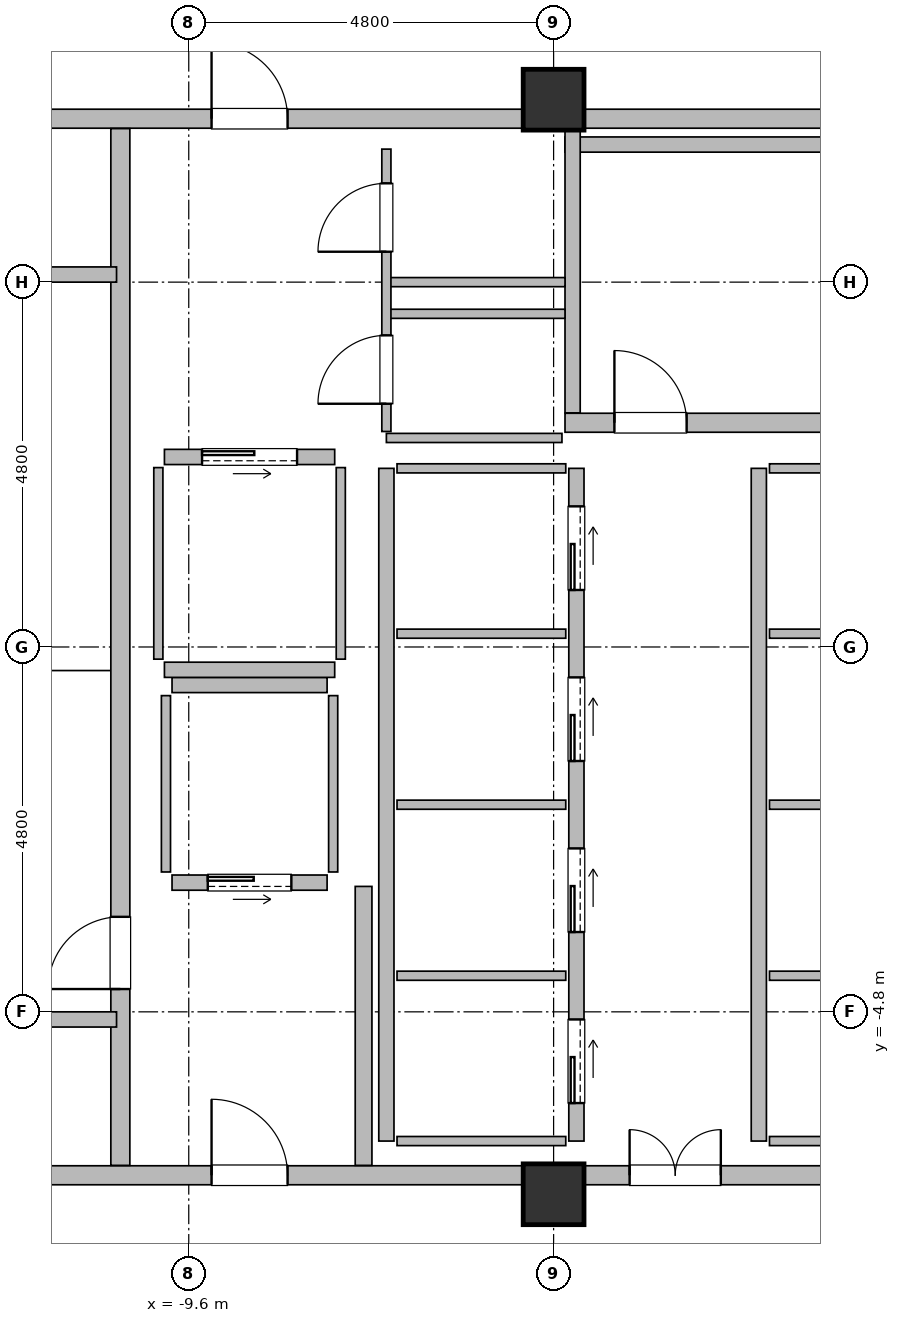
"""IFC4 building model, lengths in metres.
Left out: names, types, materials, properties, quantities, classifications, styles, units other than length and angle.
Written with IfcOpenShell. Run it as: python <this file> out.ifc"""

import sys

from ifc_helpers import new_model, si_unit, direction, frame, frame_2d, origin, origin_2d, place, context, subcontext, project, spatial, rectangle, hollow_rectangle, extrude, element, fill, save


model = new_model("IFC4")
c1 = context("Model", 3, precision=1e-05, world=origin(), true_north=direction((0.0, 1.0)))
c2 = subcontext(c1, "Body", "Model", "MODEL_VIEW")
j1 = project(units=[si_unit("LENGTHUNIT", "METRE"), si_unit("PLANEANGLEUNIT", "RADIAN")], contexts=[c1])
p1 = place(None, origin())
s1 = spatial("IfcSite", under=j1, at=p1, CompositionType="ELEMENT")
p2 = place(p1, origin())
s2 = spatial("IfcBuilding", under=s1, at=p2, CompositionType="ELEMENT")
p3 = place(p2, frame((0.0, 0.0, 48.5)))
s3 = spatial("IfcBuildingStorey", under=s2, at=p3, CompositionType="ELEMENT", Elevation=48.5)
for number, where, z_axis, x_axis in (
    (1, (-4.8, -7.2, 0.0), (0.0, 0.0, 1.0), (1.0, 0.0, 0.0)),
    (2, (-4.8, 7.2, 0.0), (0.0, 0.0, 1.0), (1.0, 0.0, 0.0)),
):
    element("IfcColumn", number, at=place(p3, frame(where, z_axis=z_axis, x_axis=x_axis)), inside=s3, PredefinedType="COLUMN", context=c2, shape_type="SweptSolid", body=[
        extrude(hollow_rectangle(XDim=0.8, YDim=0.8, WallThickness=0.036, at=origin_2d()), origin(), (0.0, 0.0, 1.0), 3.7),
    ])
p4 = place(p3, frame((-14.2, -6.95, 0.0), z_axis=(0.0, 0.0, 1.0), x_axis=(1.0, 0.0, 0.0)))
e3 = element("IfcWall", 3, at=p4, inside=s3, PredefinedType="SOLIDWALL", context=c2, shape_type="SweptSolid", body=[
    extrude(rectangle(XDim=9.4, YDim=0.25, at=frame_2d((4.7, 0.0))), origin(), (0.0, 0.0, 1.0), 2.62),
])
p5 = place(p4, frame((4.9, 0.0, 0.0)))
e4 = element("IfcOpeningElement", 4, at=p5, cuts=e3, PredefinedType="OPENING", context=c2, shape_type="SweptSolid", body=[
    extrude(rectangle(XDim=1.0, YDim=2.15, at=frame_2d((0.5, 1.075))), frame((0.0, 0.14, 0.0), z_axis=(0.0, -1.0, 0.0), x_axis=(1.0, 0.0, 0.0)), (0.0, 0.0, 1.0), 0.28),
])
p6 = place(p3, frame((-4.6, -6.95, 0.0), z_axis=(0.0, 0.0, 1.0), x_axis=(1.0, 0.0, 0.0)))
e5 = element("IfcWall", 5, at=p6, inside=s3, PredefinedType="SOLIDWALL", context=c2, shape_type="SweptSolid", body=[
    extrude(rectangle(XDim=9.2, YDim=0.25, at=frame_2d((4.6, 0.0))), origin(), (0.0, 0.0, 1.0), 2.32),
])
p7 = place(p6, frame((0.8, 0.0, 0.0)))
e6 = element("IfcOpeningElement", 6, at=p7, cuts=e5, PredefinedType="OPENING", context=c2, shape_type="SweptSolid", body=[
    extrude(rectangle(XDim=1.2, YDim=2.2, at=frame_2d((0.6, 1.1))), frame((0.0, 0.14, 0.0), z_axis=(0.0, -1.0, 0.0), x_axis=(1.0, 0.0, 0.0)), (0.0, 0.0, 1.0), 0.28),
])
p8 = place(p6, frame((5.55, 0.0, 0.0)))
e7 = element("IfcOpeningElement", 7, at=p8, cuts=e5, PredefinedType="OPENING", context=c2, shape_type="SweptSolid", body=[
    extrude(rectangle(XDim=1.2, YDim=2.2, at=frame_2d((0.6, 1.1))), frame((0.0, 0.14, 0.0), z_axis=(0.0, -1.0, 0.0), x_axis=(1.0, 0.0, 0.0)), (0.0, 0.0, 1.0), 0.28),
])
p9 = place(p3, frame((-14.2, 6.95, 0.0), z_axis=(0.0, 0.0, 1.0), x_axis=(1.0, 0.0, 0.0)))
e8 = element("IfcWall", 8, at=p9, inside=s3, PredefinedType="SOLIDWALL", context=c2, shape_type="SweptSolid", body=[
    extrude(rectangle(XDim=9.4, YDim=0.25, at=frame_2d((4.7, 0.0))), origin(), (0.0, 0.0, 1.0), 2.62),
])
p10 = place(p9, frame((4.9, 0.0, 0.0)))
e9 = element("IfcOpeningElement", 9, at=p10, cuts=e8, PredefinedType="OPENING", context=c2, shape_type="SweptSolid", body=[
    extrude(rectangle(XDim=1.0, YDim=2.15, at=frame_2d((0.5, 1.075))), frame((0.0, 0.14, 0.0), z_axis=(0.0, -1.0, 0.0), x_axis=(1.0, 0.0, 0.0)), (0.0, 0.0, 1.0), 0.28),
])
p11 = place(p3, frame((-4.6, 6.95, 0.0), z_axis=(0.0, 0.0, 1.0), x_axis=(1.0, 0.0, 0.0)))
e10 = element("IfcWall", 10, at=p11, inside=s3, PredefinedType="SOLIDWALL", context=c2, shape_type="SweptSolid", body=[
    extrude(rectangle(XDim=9.2, YDim=0.25, at=frame_2d((4.6, 0.0))), origin(), (0.0, 0.0, 1.0), 2.62),
])
p12 = place(p3, frame((-7.3, -6.82, 0.0), z_axis=(0.0, 0.0, 1.0), x_axis=(0.0, 1.0, 0.0)))
e11 = element("IfcWall", 11, at=p12, inside=s3, PredefinedType="SOLIDWALL", context=c2, shape_type="SweptSolid", body=[
    extrude(rectangle(XDim=3.67, YDim=0.22, at=frame_2d((1.835, 0.0))), origin(), (0.0, 0.0, 1.0), 2.62),
])
p13 = place(p3, frame((-10.5, -6.82, -0.18), z_axis=(0.0, 0.0, 1.0), x_axis=(0.0, 1.0, 0.0)))
e12 = element("IfcWall", 12, at=p13, inside=s3, PredefinedType="SOLIDWALL", context=c2, shape_type="SweptSolid", body=[
    extrude(rectangle(XDim=13.64, YDim=0.25, at=frame_2d((6.82, 0.0))), origin(), (0.0, 0.0, 1.0), 3.7),
])
p14 = place(p13, frame((2.32, 0.0, 0.18)))
e13 = element("IfcOpeningElement", 13, at=p14, cuts=e12, PredefinedType="OPENING", context=c2, shape_type="SweptSolid", body=[
    extrude(rectangle(XDim=0.95, YDim=2.15, at=frame_2d((0.475, 1.075))), frame((0.0, 0.14, 0.0), z_axis=(0.0, -1.0, 0.0), x_axis=(1.0, 0.0, 0.0)), (0.0, 0.0, 1.0), 0.28),
])
for number, where, z_axis, x_axis in (
    (14, (-14.2, -4.9, -0.18), (0.0, 0.0, 1.0), (1.0, 0.0, 0.0)),
    (15, (-14.2, 4.9, -0.18), (0.0, 0.0, 1.0), (1.0, 0.0, 0.0)),
):
    element("IfcWall", number, at=place(p3, frame(where, z_axis=z_axis, x_axis=x_axis)), inside=s3, PredefinedType="SOLIDWALL", context=c2, shape_type="SweptSolid", body=[
        extrude(rectangle(XDim=3.65, YDim=0.2, at=frame_2d((1.825, 0.0))), origin(), (0.0, 0.0, 1.0), 3.7),
    ])
p15 = place(p3, frame((-4.65, 2.95, -0.18), z_axis=(0.0, 0.0, 1.0), x_axis=(1.0, 0.0, 0.0)))
e16 = element("IfcWall", 16, at=p15, inside=s3, PredefinedType="SOLIDWALL", context=c2, shape_type="SweptSolid", body=[
    extrude(rectangle(XDim=9.9, YDim=0.25, at=frame_2d((4.95, 0.0))), origin(), (0.0, 0.0, 1.0), 3.7),
])
p16 = place(p15, frame((0.65, 0.0, 0.18)))
e17 = element("IfcOpeningElement", 17, at=p16, cuts=e16, PredefinedType="OPENING", context=c2, shape_type="SweptSolid", body=[
    extrude(rectangle(XDim=0.95, YDim=2.15, at=frame_2d((0.475, 1.075))), frame((0.0, 0.14, 0.0), z_axis=(0.0, -1.0, 0.0), x_axis=(1.0, 0.0, 0.0)), (0.0, 0.0, 1.0), 0.28),
])
p17 = place(p3, frame((-4.65, 6.61, -0.18), z_axis=(0.0, 0.0, 1.0), x_axis=(1.0, 0.0, 0.0)))
e18 = element("IfcWall", 18, at=p17, inside=s3, PredefinedType="SOLIDWALL", context=c2, shape_type="SweptSolid", body=[
    extrude(rectangle(XDim=9.9, YDim=0.2, at=frame_2d((4.95, 0.0))), origin(), (0.0, 0.0, 1.0), 3.7),
])
p18 = place(p3, frame((-4.55, 3.08, -0.18), z_axis=(0.0, 0.0, 1.0), x_axis=(0.0, 1.0, 0.0)))
e19 = element("IfcWall", 19, at=p18, inside=s3, PredefinedType="SOLIDWALL", context=c2, shape_type="SweptSolid", body=[
    extrude(rectangle(XDim=3.74, YDim=0.2, at=frame_2d((1.87, 0.0))), origin(), (0.0, 0.0, 1.0), 3.7),
])
p19 = place(p3, frame((-4.5, -6.5, 0.0), z_axis=(0.0, 0.0, 1.0), x_axis=(0.0, 1.0, 0.0)))
e20 = element("IfcWall", 20, at=p19, inside=s3, PredefinedType="SOLIDWALL", context=c2, shape_type="SweptSolid", body=[
    extrude(rectangle(XDim=8.85, YDim=0.2, at=frame_2d((4.425, 0.0))), origin(), (0.0, 0.0, 1.0), 3.52),
])
p20 = place(p19, frame((0.5, 0.0, 0.0)))
e21 = element("IfcOpeningElement", 21, at=p20, cuts=e20, PredefinedType="OPENING", context=c2, shape_type="SweptSolid", body=[
    extrude(rectangle(XDim=1.1, YDim=2.2, at=frame_2d((0.55, 1.1))), frame((0.0, 0.115, 0.0), z_axis=(0.0, -1.0, 0.0), x_axis=(1.0, 0.0, 0.0)), (0.0, 0.0, 1.0), 0.23),
])
p21 = place(p19, frame((2.75, 0.0, 0.0)))
e22 = element("IfcOpeningElement", 22, at=p21, cuts=e20, PredefinedType="OPENING", context=c2, shape_type="SweptSolid", body=[
    extrude(rectangle(XDim=1.1, YDim=2.2, at=frame_2d((0.55, 1.1))), frame((0.0, 0.115, 0.0), z_axis=(0.0, -1.0, 0.0), x_axis=(1.0, 0.0, 0.0)), (0.0, 0.0, 1.0), 0.23),
])
p22 = place(p19, frame((5.0, 0.0, 0.0)))
e23 = element("IfcOpeningElement", 23, at=p22, cuts=e20, PredefinedType="OPENING", context=c2, shape_type="SweptSolid", body=[
    extrude(rectangle(XDim=1.1, YDim=2.2, at=frame_2d((0.55, 1.1))), frame((0.0, 0.115, 0.0), z_axis=(0.0, -1.0, 0.0), x_axis=(1.0, 0.0, 0.0)), (0.0, 0.0, 1.0), 0.23),
])
p23 = place(p19, frame((7.25, 0.0, 0.0)))
e24 = element("IfcOpeningElement", 24, at=p23, cuts=e20, PredefinedType="OPENING", context=c2, shape_type="SweptSolid", body=[
    extrude(rectangle(XDim=1.1, YDim=2.2, at=frame_2d((0.55, 1.1))), frame((0.0, 0.115, 0.0), z_axis=(0.0, -1.0, 0.0), x_axis=(1.0, 0.0, 0.0)), (0.0, 0.0, 1.0), 0.23),
])
p24 = place(p3, frame((-7.0, -6.5, 0.0), z_axis=(0.0, 0.0, 1.0), x_axis=(0.0, 1.0, 0.0)))
e25 = element("IfcWall", 25, at=p24, inside=s3, PredefinedType="SOLIDWALL", context=c2, shape_type="SweptSolid", body=[
    extrude(rectangle(XDim=8.85, YDim=0.2, at=frame_2d((4.425, 0.0))), origin(), (0.0, 0.0, 1.0), 3.52),
])
for number, where, z_axis, x_axis in (
    (26, (-6.86, -6.5, 0.0), (0.0, 0.0, 1.0), (1.0, 0.0, 0.0)),
    (27, (-6.86, -4.325, 0.0), (0.0, 0.0, 1.0), (1.0, 0.0, 0.0)),
    (28, (-6.86, -2.075, 0.0), (0.0, 0.0, 1.0), (1.0, 0.0, 0.0)),
    (29, (-6.86, 0.175, 0.0), (0.0, 0.0, 1.0), (1.0, 0.0, 0.0)),
    (30, (-6.86, 2.35, 0.0), (0.0, 0.0, 1.0), (1.0, 0.0, 0.0)),
):
    element("IfcWall", number, at=place(p3, frame(where, z_axis=z_axis, x_axis=x_axis)), inside=s3, PredefinedType="PARTITIONING", context=c2, shape_type="SweptSolid", body=[
        extrude(rectangle(XDim=2.22, YDim=0.12, at=frame_2d((1.11, 0.0))), origin(), (0.0, 0.0, 1.0), 3.52),
    ])
p25 = place(p3, frame((-2.1, -6.5, 0.0), z_axis=(0.0, 0.0, 1.0), x_axis=(0.0, 1.0, 0.0)))
e31 = element("IfcWall", 31, at=p25, inside=s3, PredefinedType="SOLIDWALL", context=c2, shape_type="SweptSolid", body=[
    extrude(rectangle(XDim=8.85, YDim=0.2, at=frame_2d((4.425, 0.0))), origin(), (0.0, 0.0, 1.0), 3.52),
])
for number, where, z_axis, x_axis in (
    (32, (-1.96, -6.5, 0.0), (0.0, 0.0, 1.0), (1.0, 0.0, 0.0)),
    (33, (-1.96, -4.325, 0.0), (0.0, 0.0, 1.0), (1.0, 0.0, 0.0)),
    (34, (-1.96, -2.075, 0.0), (0.0, 0.0, 1.0), (1.0, 0.0, 0.0)),
    (35, (-1.96, 0.175, 0.0), (0.0, 0.0, 1.0), (1.0, 0.0, 0.0)),
    (36, (-1.96, 2.35, 0.0), (0.0, 0.0, 1.0), (1.0, 0.0, 0.0)),
):
    element("IfcWall", number, at=place(p3, frame(where, z_axis=z_axis, x_axis=x_axis)), inside=s3, PredefinedType="PARTITIONING", context=c2, shape_type="SweptSolid", body=[
        extrude(rectangle(XDim=2.22, YDim=0.12, at=frame_2d((1.11, 0.0))), origin(), (0.0, 0.0, 1.0), 3.52),
    ])
p26 = place(p3, frame((-9.82, -3.1, 0.0), z_axis=(0.0, 0.0, 1.0), x_axis=(1.0, 0.0, 0.0)))
e37 = element("IfcWall", 37, at=p26, inside=s3, PredefinedType="SOLIDWALL", context=c2, shape_type="SweptSolid", body=[
    extrude(rectangle(XDim=2.04, YDim=0.2, at=frame_2d((1.02, 0.0))), origin(), (0.0, 0.0, 1.0), 3.52),
])
p27 = place(p26, frame((0.47, 0.0, 0.0)))
e38 = element("IfcOpeningElement", 38, at=p27, cuts=e37, PredefinedType="OPENING", context=c2, shape_type="SweptSolid", body=[
    extrude(rectangle(XDim=1.1, YDim=2.2, at=frame_2d((0.55, 1.1))), frame((0.0, 0.115, 0.0), z_axis=(0.0, -1.0, 0.0), x_axis=(1.0, 0.0, 0.0)), (0.0, 0.0, 1.0), 0.23),
])
p28 = place(p3, frame((-9.82, -0.5, 0.0), z_axis=(0.0, 0.0, 1.0), x_axis=(1.0, 0.0, 0.0)))
e39 = element("IfcWall", 39, at=p28, inside=s3, PredefinedType="SOLIDWALL", context=c2, shape_type="SweptSolid", body=[
    extrude(rectangle(XDim=2.04, YDim=0.2, at=frame_2d((1.02, 0.0))), origin(), (0.0, 0.0, 1.0), 3.52),
])
for number, where, z_axis, x_axis in (
    (40, (-9.9, -2.96, 0.0), (0.0, 0.0, 1.0), (0.0, 1.0, 0.0)),
    (41, (-7.7, -2.96, 0.0), (0.0, 0.0, 1.0), (0.0, 1.0, 0.0)),
):
    element("IfcWall", number, at=place(p3, frame(where, z_axis=z_axis, x_axis=x_axis)), inside=s3, PredefinedType="PARTITIONING", context=c2, shape_type="SweptSolid", body=[
        extrude(rectangle(XDim=2.32, YDim=0.12, at=frame_2d((1.16, 0.0))), origin(), (0.0, 0.0, 1.0), 3.52),
    ])
p29 = place(p3, frame((-9.92, 2.5, 0.0), z_axis=(0.0, 0.0, 1.0), x_axis=(1.0, 0.0, 0.0)))
e42 = element("IfcWall", 42, at=p29, inside=s3, PredefinedType="SOLIDWALL", context=c2, shape_type="SweptSolid", body=[
    extrude(rectangle(XDim=2.24, YDim=0.2, at=frame_2d((1.12, 0.0))), origin(), (0.0, 0.0, 1.0), 3.52),
])
p30 = place(p29, frame((0.495, 0.0, 0.0)))
e43 = element("IfcOpeningElement", 43, at=p30, cuts=e42, PredefinedType="OPENING", context=c2, shape_type="SweptSolid", body=[
    extrude(rectangle(XDim=1.25, YDim=2.25, at=frame_2d((0.625, 1.125))), frame((0.0, 0.115, 0.0), z_axis=(0.0, -1.0, 0.0), x_axis=(1.0, 0.0, 0.0)), (0.0, 0.0, 1.0), 0.23),
])
p31 = place(p3, frame((-9.92, -0.3, 0.0), z_axis=(0.0, 0.0, 1.0), x_axis=(1.0, 0.0, 0.0)))
e44 = element("IfcWall", 44, at=p31, inside=s3, PredefinedType="SOLIDWALL", context=c2, shape_type="SweptSolid", body=[
    extrude(rectangle(XDim=2.24, YDim=0.2, at=frame_2d((1.12, 0.0))), origin(), (0.0, 0.0, 1.0), 3.52),
])
for number, where, z_axis, x_axis in (
    (45, (-10.0, -0.16, 0.0), (0.0, 0.0, 1.0), (0.0, 1.0, 0.0)),
    (46, (-7.6, -0.16, 0.0), (0.0, 0.0, 1.0), (0.0, 1.0, 0.0)),
):
    element("IfcWall", number, at=place(p3, frame(where, z_axis=z_axis, x_axis=x_axis)), inside=s3, PredefinedType="PARTITIONING", context=c2, shape_type="SweptSolid", body=[
        extrude(rectangle(XDim=2.52, YDim=0.12, at=frame_2d((1.26, 0.0))), origin(), (0.0, 0.0, 1.0), 3.52),
    ])
p32 = place(p3, frame((-7.0, 2.75, 0.0), z_axis=(0.0, 0.0, 1.0), x_axis=(1.0, 0.0, 0.0)))
e47 = element("IfcWall", 47, at=p32, inside=s3, PredefinedType="PARTITIONING", context=c2, shape_type="SweptSolid", body=[
    extrude(rectangle(XDim=2.31, YDim=0.12, at=frame_2d((1.155, 0.0))), origin(), (0.0, 0.0, 1.0), 3.52),
])
for number, where, z_axis, x_axis in (
    (48, (-7.0, 4.383, 0.0), (0.0, 0.0, 1.0), (1.0, 0.0, 0.0)),
    (49, (-7.0, 4.8, 0.0), (0.0, 0.0, 1.0), (1.0, 0.0, 0.0)),
):
    element("IfcWall", number, at=place(p3, frame(where, z_axis=z_axis, x_axis=x_axis)), inside=s3, PredefinedType="PARTITIONING", context=c2, shape_type="SweptSolid", body=[
        extrude(rectangle(XDim=2.35, YDim=0.12, at=frame_2d((1.175, 0.0))), origin(), (0.0, 0.0, 1.0), 3.52),
    ])
p33 = place(p3, frame((-7.0, 2.835, 0.0), z_axis=(0.0, 0.0, 1.0), x_axis=(0.0, 1.0, 0.0)))
e50 = element("IfcWall", 50, at=p33, inside=s3, PredefinedType="PARTITIONING", context=c2, shape_type="SweptSolid", body=[
    extrude(rectangle(XDim=3.715, YDim=0.12, at=frame_2d((1.857, 0.0))), origin(), (0.0, 0.0, 1.0), 3.52),
])
p34 = place(p33, frame((0.365, 0.0, 0.0)))
e51 = element("IfcOpeningElement", 51, at=p34, cuts=e50, PredefinedType="OPENING", context=c2, shape_type="SweptSolid", body=[
    extrude(rectangle(XDim=0.9, YDim=2.1, at=frame_2d((0.45, 1.05))), frame((0.0, 0.075, 0.0), z_axis=(0.0, -1.0, 0.0), x_axis=(1.0, 0.0, 0.0)), (0.0, 0.0, 1.0), 0.15),
])
p35 = place(p33, frame((2.365, 0.0, 0.0)))
e52 = element("IfcOpeningElement", 52, at=p35, cuts=e50, PredefinedType="OPENING", context=c2, shape_type="SweptSolid", body=[
    extrude(rectangle(XDim=0.9, YDim=2.1, at=frame_2d((0.45, 1.05))), frame((0.0, 0.075, 0.0), z_axis=(0.0, -1.0, 0.0), x_axis=(1.0, 0.0, 0.0)), (0.0, 0.0, 1.0), 0.15),
])
p36 = place(p5, origin())
e53 = element("IfcDoor", 53, at=p36, inside=s3, OperationType="SINGLE_SWING_RIGHT", PredefinedType="DOOR", context=c2, shape_type="SweptSolid", body=[
    extrude(rectangle(XDim=1.0, YDim=2.15, at=frame_2d((0.5, 1.075))), frame((0.0, 0.025, 0.0), z_axis=(0.0, -1.0, 0.0), x_axis=(1.0, 0.0, 0.0)), (0.0, 0.0, 1.0), 0.05),
])
fill(e4, e53)
p37 = place(p7, origin())
e54 = element("IfcDoor", 54, at=p37, inside=s3, OperationType="DOUBLE_DOOR_SINGLE_SWING", PredefinedType="DOOR", context=c2, shape_type="SweptSolid", body=[
    extrude(rectangle(XDim=1.2, YDim=2.2, at=frame_2d((0.6, 1.1))), frame((0.0, 0.025, 0.0), z_axis=(0.0, -1.0, 0.0), x_axis=(1.0, 0.0, 0.0)), (0.0, 0.0, 1.0), 0.05),
])
fill(e6, e54)
p38 = place(p10, origin())
e55 = element("IfcDoor", 55, at=p38, inside=s3, OperationType="SINGLE_SWING_LEFT", PredefinedType="DOOR", context=c2, shape_type="SweptSolid", body=[
    extrude(rectangle(XDim=1.0, YDim=2.15, at=frame_2d((0.5, 1.075))), frame((0.0, 0.025, 0.0), z_axis=(0.0, -1.0, 0.0), x_axis=(1.0, 0.0, 0.0)), (0.0, 0.0, 1.0), 0.05),
])
fill(e9, e55)
p39 = place(p14, origin())
e56 = element("IfcDoor", 56, at=p39, inside=s3, OperationType="SINGLE_SWING_LEFT", PredefinedType="DOOR", context=c2, shape_type="SweptSolid", body=[
    extrude(rectangle(XDim=0.95, YDim=2.15, at=frame_2d((0.475, 1.075))), frame((0.0, 0.025, 0.0), z_axis=(0.0, -1.0, 0.0), x_axis=(1.0, 0.0, 0.0)), (0.0, 0.0, 1.0), 0.05),
])
fill(e13, e56)
p40 = place(p16, origin())
e57 = element("IfcDoor", 57, at=p40, inside=s3, OperationType="SINGLE_SWING_RIGHT", PredefinedType="DOOR", context=c2, shape_type="SweptSolid", body=[
    extrude(rectangle(XDim=0.95, YDim=2.15, at=frame_2d((0.475, 1.075))), frame((0.0, 0.025, 0.0), z_axis=(0.0, -1.0, 0.0), x_axis=(1.0, 0.0, 0.0)), (0.0, 0.0, 1.0), 0.05),
])
fill(e17, e57)
p41 = place(p20, origin())
e58 = element("IfcDoor", 58, at=p41, inside=s3, OperationType="SLIDING_TO_LEFT", PredefinedType="DOOR", context=c2, shape_type="SweptSolid", body=[
    extrude(rectangle(XDim=1.1, YDim=2.2, at=frame_2d((0.55, 1.1))), frame((0.0, 0.025, 0.0), z_axis=(0.0, -1.0, 0.0), x_axis=(1.0, 0.0, 0.0)), (0.0, 0.0, 1.0), 0.05),
])
fill(e21, e58)
p42 = place(p21, origin())
e59 = element("IfcDoor", 59, at=p42, inside=s3, OperationType="SLIDING_TO_LEFT", PredefinedType="DOOR", context=c2, shape_type="SweptSolid", body=[
    extrude(rectangle(XDim=1.1, YDim=2.2, at=frame_2d((0.55, 1.1))), frame((0.0, 0.025, 0.0), z_axis=(0.0, -1.0, 0.0), x_axis=(1.0, 0.0, 0.0)), (0.0, 0.0, 1.0), 0.05),
])
fill(e22, e59)
p43 = place(p22, origin())
e60 = element("IfcDoor", 60, at=p43, inside=s3, OperationType="SLIDING_TO_LEFT", PredefinedType="DOOR", context=c2, shape_type="SweptSolid", body=[
    extrude(rectangle(XDim=1.1, YDim=2.2, at=frame_2d((0.55, 1.1))), frame((0.0, 0.025, 0.0), z_axis=(0.0, -1.0, 0.0), x_axis=(1.0, 0.0, 0.0)), (0.0, 0.0, 1.0), 0.05),
])
fill(e23, e60)
p44 = place(p23, origin())
e61 = element("IfcDoor", 61, at=p44, inside=s3, OperationType="SLIDING_TO_LEFT", PredefinedType="DOOR", context=c2, shape_type="SweptSolid", body=[
    extrude(rectangle(XDim=1.1, YDim=2.2, at=frame_2d((0.55, 1.1))), frame((0.0, 0.025, 0.0), z_axis=(0.0, -1.0, 0.0), x_axis=(1.0, 0.0, 0.0)), (0.0, 0.0, 1.0), 0.05),
])
fill(e24, e61)
p45 = place(p27, origin())
e62 = element("IfcDoor", 62, at=p45, inside=s3, OperationType="SLIDING_TO_LEFT", PredefinedType="DOOR", context=c2, shape_type="SweptSolid", body=[
    extrude(rectangle(XDim=1.1, YDim=2.2, at=frame_2d((0.55, 1.1))), frame((0.0, 0.025, 0.0), z_axis=(0.0, -1.0, 0.0), x_axis=(1.0, 0.0, 0.0)), (0.0, 0.0, 1.0), 0.05),
])
fill(e38, e62)
p46 = place(p30, origin())
e63 = element("IfcDoor", 63, at=p46, inside=s3, OperationType="SLIDING_TO_LEFT", PredefinedType="DOOR", context=c2, shape_type="SweptSolid", body=[
    extrude(rectangle(XDim=1.25, YDim=2.25, at=frame_2d((0.625, 1.125))), frame((0.0, 0.025, 0.0), z_axis=(0.0, -1.0, 0.0), x_axis=(1.0, 0.0, 0.0)), (0.0, 0.0, 1.0), 0.05),
])
fill(e43, e63)
p47 = place(p34, origin())
e64 = element("IfcDoor", 64, at=p47, inside=s3, OperationType="SINGLE_SWING_RIGHT", PredefinedType="DOOR", context=c2, shape_type="SweptSolid", body=[
    extrude(rectangle(XDim=0.9, YDim=2.1, at=frame_2d((0.45, 1.05))), frame((0.0, 0.025, 0.0), z_axis=(0.0, -1.0, 0.0), x_axis=(1.0, 0.0, 0.0)), (0.0, 0.0, 1.0), 0.05),
])
fill(e51, e64)
p48 = place(p35, origin())
e65 = element("IfcDoor", 65, at=p48, inside=s3, OperationType="SINGLE_SWING_RIGHT", PredefinedType="DOOR", context=c2, shape_type="SweptSolid", body=[
    extrude(rectangle(XDim=0.9, YDim=2.1, at=frame_2d((0.45, 1.05))), frame((0.0, 0.025, 0.0), z_axis=(0.0, -1.0, 0.0), x_axis=(1.0, 0.0, 0.0)), (0.0, 0.0, 1.0), 0.05),
])
fill(e52, e65)
save(model, sys.argv[1])
